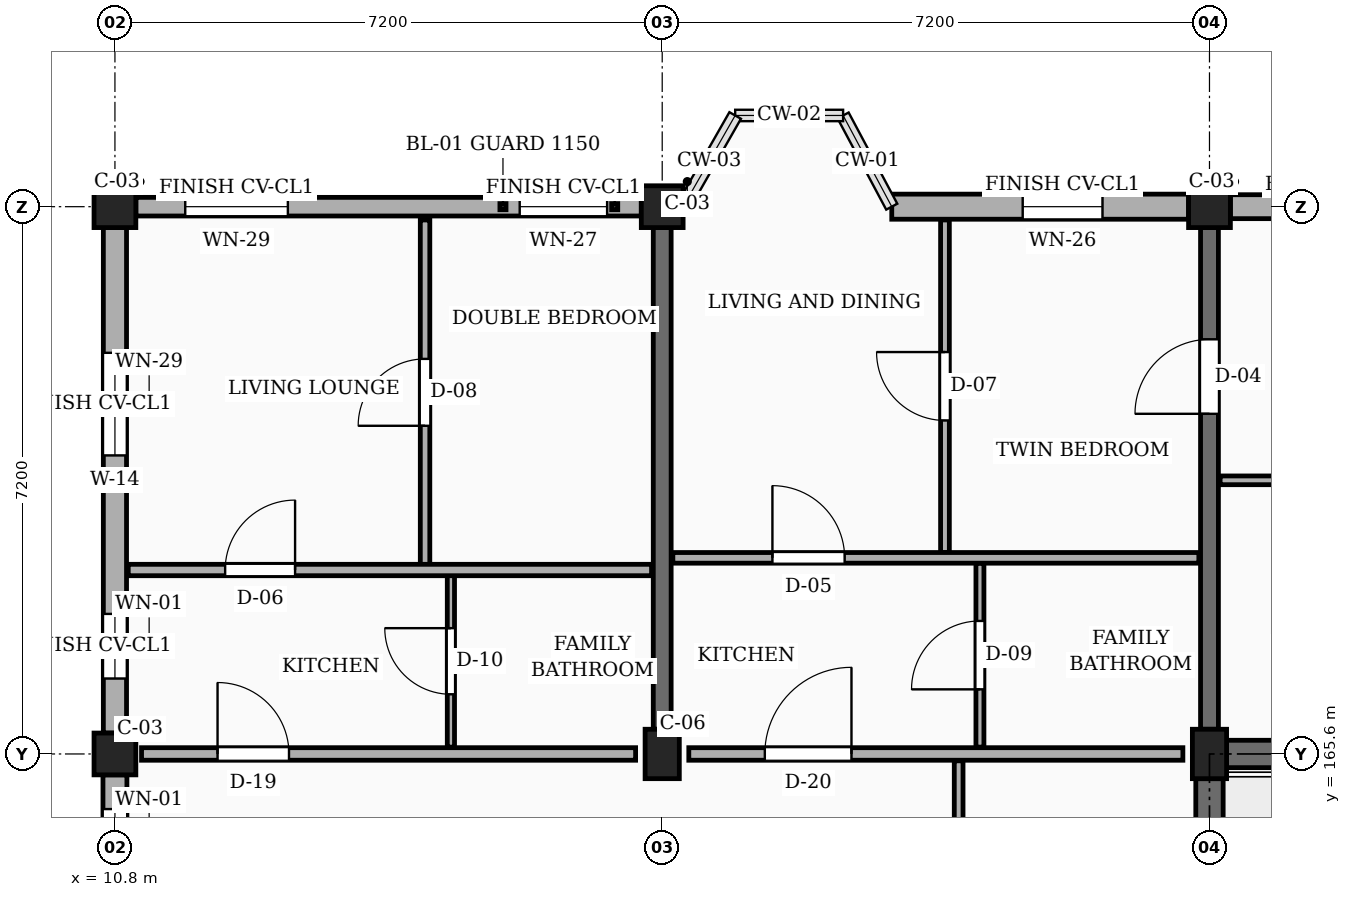
"""IFC4 building model, lengths in metres.
Left out: names, types, materials, properties, quantities, classifications, styles, units other than length and angle.
Written with IfcOpenShell. Run it as: python <this file> out.ifc"""

import sys

from ifc_helpers import new_model, si_unit, direction, frame, frame_2d, origin, origin_2d, place, context, subcontext, project, spatial, rectangle, extrude, element, fill, save


model = new_model("IFC4")
c1 = context("Model", 3, precision=1e-05, world=origin(), true_north=direction((0.0, 1.0)))
c2 = subcontext(c1, "Body", "Model", "MODEL_VIEW")
j1 = project(units=[si_unit("LENGTHUNIT", "METRE"), si_unit("PLANEANGLEUNIT", "RADIAN")], contexts=[c1])
p1 = place(None, origin())
s1 = spatial("IfcSite", under=j1, at=p1, CompositionType="ELEMENT")
p2 = place(p1, origin())
s2 = spatial("IfcBuilding", under=s1, at=p2, CompositionType="ELEMENT")
p3 = place(p2, frame((0.0, 0.0, 20.25)))
s3 = spatial("IfcBuildingStorey", under=s2, at=p3, CompositionType="ELEMENT", Elevation=20.25)
for number, where, z_axis, x_axis in (
    (1, (10.8, 165.6, 0.0), (0.0, 0.0, 1.0), (1.0, 0.0, 0.0)),
    (2, (10.8, 172.8, 0.0), (0.0, 0.0, 1.0), (1.0, 0.0, 0.0)),
):
    element("IfcColumn", number, at=place(p3, frame(where, z_axis=z_axis, x_axis=x_axis)), inside=s3, PredefinedType="COLUMN", context=c2, shape_type="SweptSolid", body=[
        extrude(rectangle(XDim=0.55, YDim=0.55, at=origin_2d()), origin(), (0.0, 0.0, 1.0), 3.15),
    ])
p4 = place(p3, frame((18.0, 165.6, 0.0), z_axis=(0.0, 0.0, 1.0), x_axis=(1.0, 0.0, 0.0)))
e3 = element("IfcColumn", 3, at=p4, inside=s3, PredefinedType="COLUMN", context=c2, shape_type="SweptSolid", body=[
    extrude(rectangle(XDim=0.45, YDim=0.65, at=origin_2d()), origin(), (0.0, 0.0, 1.0), 3.15),
])
p5 = place(p3, frame((18.0, 172.8, 0.0), z_axis=(0.0, 0.0, 1.0), x_axis=(1.0, 0.0, 0.0)))
e4 = element("IfcColumn", 4, at=p5, inside=s3, PredefinedType="COLUMN", context=c2, shape_type="SweptSolid", body=[
    extrude(rectangle(XDim=0.55, YDim=0.55, at=origin_2d()), origin(), (0.0, 0.0, 1.0), 3.15),
])
p6 = place(p3, frame((25.2, 165.6, 0.0), z_axis=(0.0, 0.0, 1.0), x_axis=(1.0, 0.0, 0.0)))
e5 = element("IfcColumn", 5, at=p6, inside=s3, PredefinedType="COLUMN", context=c2, shape_type="SweptSolid", body=[
    extrude(rectangle(XDim=0.45, YDim=0.65, at=origin_2d()), origin(), (0.0, 0.0, 1.0), 3.15),
])
p7 = place(p3, frame((25.2, 172.8, 0.0), z_axis=(0.0, 0.0, 1.0), x_axis=(1.0, 0.0, 0.0)))
e6 = element("IfcColumn", 6, at=p7, inside=s3, PredefinedType="COLUMN", context=c2, shape_type="SweptSolid", body=[
    extrude(rectangle(XDim=0.55, YDim=0.55, at=origin_2d()), origin(), (0.0, 0.0, 1.0), 3.15),
])
p8 = place(p3, frame((18.0, 165.925, 0.0), z_axis=(0.0, 0.0, 1.0), x_axis=(0.0, 1.0, 0.0)))
e7 = element("IfcWall", 7, at=p8, inside=s3, PredefinedType="SOLIDWALL", context=c2, shape_type="SweptSolid", body=[
    extrude(rectangle(XDim=6.6, YDim=0.235, at=frame_2d((3.3, 0.0))), origin(), (0.0, 0.0, 1.0), 2.185),
])
p9 = place(p3, frame((25.2, 165.925, 0.0), z_axis=(0.0, 0.0, 1.0), x_axis=(0.0, 1.0, 0.0)))
e8 = element("IfcWall", 8, at=p9, inside=s3, PredefinedType="SOLIDWALL", context=c2, shape_type="SweptSolid", body=[
    extrude(rectangle(XDim=6.6, YDim=0.235, at=frame_2d((3.3, 0.0))), origin(), (0.0, 0.0, 1.0), 2.185),
])
p10 = place(p9, frame((4.15, 0.0, 0.0)))
e9 = element("IfcOpeningElement", 9, at=p10, cuts=e8, PredefinedType="OPENING", context=c2, shape_type="SweptSolid", body=[
    extrude(rectangle(XDim=0.98, YDim=2.12, at=frame_2d((0.49, 1.06))), frame((0.0, 0.127, 0.0), z_axis=(0.0, -1.0, 0.0), x_axis=(1.0, 0.0, 0.0)), (0.0, 0.0, 1.0), 0.255),
])
p11 = place(p3, frame((32.125, 172.8, 0.0), z_axis=(0.0, 0.0, 1.0), x_axis=(-1.0, 0.0, 0.0)))
e10 = element("IfcWall", 10, at=p11, inside=s3, PredefinedType="SOLIDWALL", context=c2, shape_type="SweptSolid", body=[
    extrude(rectangle(XDim=6.65, YDim=0.315, at=frame_2d((3.325, 0.0))), origin(), (0.0, 0.0, 1.0), 2.455),
])
p12 = place(p11, frame((0.45, 0.0, 0.78)))
e11 = element("IfcOpeningElement", 11, at=p12, cuts=e10, PredefinedType="OPENING", context=c2, shape_type="SweptSolid", body=[
    extrude(rectangle(XDim=1.46, YDim=1.36, at=frame_2d((0.73, 0.68))), frame((0.0, 0.167, 0.0), z_axis=(0.0, -1.0, 0.0), x_axis=(1.0, 0.0, 0.0)), (0.0, 0.0, 1.0), 0.335),
])
p13 = place(p11, frame((4.65, 0.0, 0.78)))
e12 = element("IfcOpeningElement", 12, at=p13, cuts=e10, PredefinedType="OPENING", context=c2, shape_type="SweptSolid", body=[
    extrude(rectangle(XDim=1.05, YDim=1.44, at=frame_2d((0.525, 0.72))), frame((0.0, 0.167, 0.0), z_axis=(0.0, -1.0, 0.0), x_axis=(1.0, 0.0, 0.0)), (0.0, 0.0, 1.0), 0.335),
])
p14 = place(p3, frame((24.925, 172.8, 0.0), z_axis=(0.0, 0.0, 1.0), x_axis=(-1.0, 0.0, 0.0)))
e13 = element("IfcWall", 13, at=p14, inside=s3, PredefinedType="SOLIDWALL", context=c2, shape_type="SweptSolid", body=[
    extrude(rectangle(XDim=3.905, YDim=0.33, at=frame_2d((1.953, 0.0))), origin(), (0.0, 0.0, 1.0), 2.455),
])
p15 = place(p14, frame((1.133, 0.0, 0.78)))
e14 = element("IfcOpeningElement", 14, at=p15, cuts=e13, PredefinedType="OPENING", context=c2, shape_type="SweptSolid", body=[
    extrude(rectangle(XDim=1.05, YDim=1.44, at=frame_2d((0.525, 0.72))), frame((0.0, 0.175, 0.0), z_axis=(0.0, -1.0, 0.0), x_axis=(1.0, 0.0, 0.0)), (0.0, 0.0, 1.0), 0.35),
])
p16 = place(p3, frame((17.725, 172.8, 0.0), z_axis=(0.0, 0.0, 1.0), x_axis=(-1.0, 0.0, 0.0)))
e15 = element("IfcWall", 15, at=p16, inside=s3, PredefinedType="SOLIDWALL", context=c2, shape_type="SweptSolid", body=[
    extrude(rectangle(XDim=6.65, YDim=0.245, at=frame_2d((3.325, 0.0))), origin(), (0.0, 0.0, 1.0), 2.455),
])
p17 = place(p16, frame((0.45, 0.0, 0.78)))
e16 = element("IfcOpeningElement", 16, at=p17, cuts=e15, PredefinedType="OPENING", context=c2, shape_type="SweptSolid", body=[
    extrude(rectangle(XDim=1.15, YDim=1.44, at=frame_2d((0.575, 0.72))), frame((0.0, 0.133, 0.0), z_axis=(0.0, -1.0, 0.0), x_axis=(1.0, 0.0, 0.0)), (0.0, 0.0, 1.0), 0.265),
])
p18 = place(p16, frame((4.65, 0.0, 0.78)))
e17 = element("IfcOpeningElement", 17, at=p18, cuts=e15, PredefinedType="OPENING", context=c2, shape_type="SweptSolid", body=[
    extrude(rectangle(XDim=1.35, YDim=1.44, at=frame_2d((0.675, 0.72))), frame((0.0, 0.133, 0.0), z_axis=(0.0, -1.0, 0.0), x_axis=(1.0, 0.0, 0.0)), (0.0, 0.0, 1.0), 0.265),
])
p19 = place(p3, frame((10.8, 172.525, 0.0), z_axis=(0.0, 0.0, 1.0), x_axis=(0.0, -1.0, 0.0)))
e18 = element("IfcWall", 18, at=p19, inside=s3, PredefinedType="SOLIDWALL", context=c2, shape_type="SweptSolid", body=[
    extrude(rectangle(XDim=6.65, YDim=0.305, at=frame_2d((3.325, 0.0))), origin(), (0.0, 0.0, 1.0), 2.455),
])
p20 = place(p19, frame((1.647, 0.0, 0.78)))
e19 = element("IfcOpeningElement", 19, at=p20, cuts=e18, PredefinedType="OPENING", context=c2, shape_type="SweptSolid", body=[
    extrude(rectangle(XDim=1.35, YDim=1.44, at=frame_2d((0.675, 0.72))), frame((0.0, 0.163, 0.0), z_axis=(0.0, -1.0, 0.0), x_axis=(1.0, 0.0, 0.0)), (0.0, 0.0, 1.0), 0.325),
])
p21 = place(p19, frame((5.083, 0.0, 0.78)))
e20 = element("IfcOpeningElement", 20, at=p21, cuts=e18, PredefinedType="OPENING", context=c2, shape_type="SweptSolid", body=[
    extrude(rectangle(XDim=0.85, YDim=1.15, at=frame_2d((0.425, 0.575))), frame((0.0, 0.163, 0.0), z_axis=(0.0, -1.0, 0.0), x_axis=(1.0, 0.0, 0.0)), (0.0, 0.0, 1.0), 0.325),
])
p22 = place(p3, frame((10.8, 165.325, 0.0), z_axis=(0.0, 0.0, 1.0), x_axis=(0.0, -1.0, 0.0)))
e21 = element("IfcWall", 21, at=p22, inside=s3, PredefinedType="SOLIDWALL", context=c2, shape_type="SweptSolid", body=[
    extrude(rectangle(XDim=6.65, YDim=0.315, at=frame_2d((3.325, 0.0))), origin(), (0.0, 0.0, 1.0), 2.455),
])
p23 = place(p22, frame((0.45, 0.0, 0.78)))
e22 = element("IfcOpeningElement", 22, at=p23, cuts=e21, PredefinedType="OPENING", context=c2, shape_type="SweptSolid", body=[
    extrude(rectangle(XDim=0.85, YDim=1.15, at=frame_2d((0.425, 0.575))), frame((0.0, 0.167, 0.0), z_axis=(0.0, -1.0, 0.0), x_axis=(1.0, 0.0, 0.0)), (0.0, 0.0, 1.0), 0.335),
])
p24 = place(p22, frame((4.65, 0.0, 0.78)))
e23 = element("IfcOpeningElement", 23, at=p24, cuts=e21, PredefinedType="OPENING", context=c2, shape_type="SweptSolid", body=[
    extrude(rectangle(XDim=1.0, YDim=1.15, at=frame_2d((0.5, 0.575))), frame((0.0, 0.167, 0.0), z_axis=(0.0, -1.0, 0.0), x_axis=(1.0, 0.0, 0.0)), (0.0, 0.0, 1.0), 0.335),
])
p25 = place(p3, frame((25.2, 158.725, 0.0), z_axis=(0.0, 0.0, 1.0), x_axis=(0.0, 1.0, 0.0)))
e24 = element("IfcWall", 24, at=p25, inside=s3, PredefinedType="SHEAR", context=c2, shape_type="SweptSolid", body=[
    extrude(rectangle(XDim=6.55, YDim=0.36, at=frame_2d((3.275, 0.0))), origin(), (0.0, 0.0, 1.0), 2.885),
])
p26 = place(p3, frame((25.425, 165.6, 0.0), z_axis=(0.0, 0.0, 1.0), x_axis=(1.0, 0.0, 0.0)))
e25 = element("IfcWall", 25, at=p26, inside=s3, PredefinedType="SHEAR", context=c2, shape_type="SweptSolid", body=[
    extrude(rectangle(XDim=6.75, YDim=0.36, at=frame_2d((3.375, 0.0))), origin(), (0.0, 0.0, 1.0), 2.885),
])
p27 = place(p3, frame((11.15, 165.6, 0.0), z_axis=(0.0, 0.0, 1.0), x_axis=(1.0, 0.0, 0.0)))
e26 = element("IfcWall", 26, at=p27, inside=s3, PredefinedType="PARTITIONING", context=c2, shape_type="SweptSolid", body=[
    extrude(rectangle(XDim=6.5, YDim=0.165, at=frame_2d((3.25, 0.0))), origin(), (0.0, 0.0, 1.0), 2.32),
])
p28 = place(p27, frame((1.0, 0.0, 0.0)))
e27 = element("IfcOpeningElement", 27, at=p28, cuts=e26, PredefinedType="OPENING", context=c2, shape_type="SweptSolid", body=[
    extrude(rectangle(XDim=0.94, YDim=2.12, at=frame_2d((0.47, 1.06))), frame((0.0, 0.093, 0.0), z_axis=(0.0, -1.0, 0.0), x_axis=(1.0, 0.0, 0.0)), (0.0, 0.0, 1.0), 0.185),
])
p29 = place(p3, frame((18.35, 165.6, 0.0), z_axis=(0.0, 0.0, 1.0), x_axis=(1.0, 0.0, 0.0)))
e28 = element("IfcWall", 28, at=p29, inside=s3, PredefinedType="PARTITIONING", context=c2, shape_type="SweptSolid", body=[
    extrude(rectangle(XDim=6.5, YDim=0.165, at=frame_2d((3.25, 0.0))), origin(), (0.0, 0.0, 1.0), 2.32),
])
p30 = place(p29, frame((1.0, 0.0, 0.0)))
e29 = element("IfcOpeningElement", 29, at=p30, cuts=e28, PredefinedType="OPENING", context=c2, shape_type="SweptSolid", body=[
    extrude(rectangle(XDim=1.14, YDim=2.18, at=frame_2d((0.57, 1.09))), frame((0.0, 0.093, 0.0), z_axis=(0.0, -1.0, 0.0), x_axis=(1.0, 0.0, 0.0)), (0.0, 0.0, 1.0), 0.185),
])
p31 = place(p3, frame((14.88, 168.09, 0.0), z_axis=(0.0, 0.0, 1.0), x_axis=(0.0, 1.0, 0.0)))
e30 = element("IfcWall", 30, at=p31, inside=s3, PredefinedType="PARTITIONING", context=c2, shape_type="SweptSolid", body=[
    extrude(rectangle(XDim=4.535, YDim=0.125, at=frame_2d((2.268, 0.0))), origin(), (0.0, 0.0, 1.0), 2.32),
])
p32 = place(p31, frame((1.827, 0.0, 0.0)))
e31 = element("IfcOpeningElement", 31, at=p32, cuts=e30, PredefinedType="OPENING", context=c2, shape_type="SweptSolid", body=[
    extrude(rectangle(XDim=0.88, YDim=2.08, at=frame_2d((0.44, 1.04))), frame((0.0, 0.073, 0.0), z_axis=(0.0, -1.0, 0.0), x_axis=(1.0, 0.0, 0.0)), (0.0, 0.0, 1.0), 0.145),
])
p33 = place(p3, frame((15.22, 165.69, 0.0), z_axis=(0.0, 0.0, 1.0), x_axis=(0.0, 1.0, 0.0)))
e32 = element("IfcWall", 32, at=p33, inside=s3, PredefinedType="PARTITIONING", context=c2, shape_type="SweptSolid", body=[
    extrude(rectangle(XDim=2.26, YDim=0.095, at=frame_2d((1.13, 0.0))), origin(), (0.0, 0.0, 1.0), 2.32),
])
p34 = place(p33, frame((0.695, 0.0, 0.0)))
e33 = element("IfcOpeningElement", 33, at=p34, cuts=e32, PredefinedType="OPENING", context=c2, shape_type="SweptSolid", body=[
    extrude(rectangle(XDim=0.87, YDim=2.05, at=frame_2d((0.435, 1.025))), frame((0.0, 0.058, 0.0), z_axis=(0.0, -1.0, 0.0), x_axis=(1.0, 0.0, 0.0)), (0.0, 0.0, 1.0), 0.115),
])
p35 = place(p3, frame((10.975, 168.02, 0.0), z_axis=(0.0, 0.0, 1.0), x_axis=(1.0, 0.0, 0.0)))
e34 = element("IfcWall", 34, at=p35, inside=s3, PredefinedType="PARTITIONING", context=c2, shape_type="SweptSolid", body=[
    extrude(rectangle(XDim=6.885, YDim=0.15, at=frame_2d((3.442, 0.0))), origin(), (0.0, 0.0, 1.0), 2.32),
])
p36 = place(p35, frame((1.275, 0.0, 0.0)))
e35 = element("IfcOpeningElement", 35, at=p36, cuts=e34, PredefinedType="OPENING", context=c2, shape_type="SweptSolid", body=[
    extrude(rectangle(XDim=0.92, YDim=2.1, at=frame_2d((0.46, 1.05))), frame((0.0, 0.085, 0.0), z_axis=(0.0, -1.0, 0.0), x_axis=(1.0, 0.0, 0.0)), (0.0, 0.0, 1.0), 0.17),
])
p37 = place(p3, frame((21.9, 158.49, 0.0), z_axis=(0.0, 0.0, 1.0), x_axis=(0.0, 1.0, 0.0)))
e36 = element("IfcWall", 36, at=p37, inside=s3, PredefinedType="PARTITIONING", context=c2, shape_type="SweptSolid", body=[
    extrude(rectangle(XDim=7.02, YDim=0.115, at=frame_2d((3.51, 0.0))), origin(), (0.0, 0.0, 1.0), 2.32),
])
p38 = place(p37, frame((2.85, 0.0, 0.0)))
e37 = element("IfcOpeningElement", 37, at=p38, cuts=e36, PredefinedType="OPENING", context=c2, shape_type="SweptSolid", body=[
    extrude(rectangle(XDim=1.02, YDim=2.15, at=frame_2d((0.51, 1.075))), frame((0.0, 0.067, 0.0), z_axis=(0.0, -1.0, 0.0), x_axis=(1.0, 0.0, 0.0)), (0.0, 0.0, 1.0), 0.135),
])
p39 = place(p3, frame((21.72, 168.25, 0.0), z_axis=(0.0, 0.0, 1.0), x_axis=(0.0, 1.0, 0.0)))
e38 = element("IfcWall", 38, at=p39, inside=s3, PredefinedType="PARTITIONING", context=c2, shape_type="SweptSolid", body=[
    extrude(rectangle(XDim=4.375, YDim=0.115, at=frame_2d((2.188, 0.0))), origin(), (0.0, 0.0, 1.0), 2.32),
])
p40 = place(p39, frame((1.738, 0.0, 0.0)))
e39 = element("IfcOpeningElement", 39, at=p40, cuts=e38, PredefinedType="OPENING", context=c2, shape_type="SweptSolid", body=[
    extrude(rectangle(XDim=0.9, YDim=2.1, at=frame_2d((0.45, 1.05))), frame((0.0, 0.067, 0.0), z_axis=(0.0, -1.0, 0.0), x_axis=(1.0, 0.0, 0.0)), (0.0, 0.0, 1.0), 0.135),
])
p41 = place(p3, frame((22.18, 165.69, 0.0), z_axis=(0.0, 0.0, 1.0), x_axis=(0.0, 1.0, 0.0)))
e40 = element("IfcWall", 40, at=p41, inside=s3, PredefinedType="PARTITIONING", context=c2, shape_type="SweptSolid", body=[
    extrude(rectangle(XDim=2.42, YDim=0.105, at=frame_2d((1.21, 0.0))), origin(), (0.0, 0.0, 1.0), 2.32),
])
p42 = place(p41, frame((0.76, 0.0, 0.0)))
e41 = element("IfcOpeningElement", 41, at=p42, cuts=e40, PredefinedType="OPENING", context=c2, shape_type="SweptSolid", body=[
    extrude(rectangle(XDim=0.9, YDim=2.05, at=frame_2d((0.45, 1.025))), frame((0.0, 0.062, 0.0), z_axis=(0.0, -1.0, 0.0), x_axis=(1.0, 0.0, 0.0)), (0.0, 0.0, 1.0), 0.125),
])
p43 = place(p3, frame((18.14, 168.18, 0.0), z_axis=(0.0, 0.0, 1.0), x_axis=(1.0, 0.0, 0.0)))
e42 = element("IfcWall", 42, at=p43, inside=s3, PredefinedType="PARTITIONING", context=c2, shape_type="SweptSolid", body=[
    extrude(rectangle(XDim=6.92, YDim=0.14, at=frame_2d((3.46, 0.0))), origin(), (0.0, 0.0, 1.0), 2.32),
])
p44 = place(p43, frame((1.31, 0.0, 0.0)))
e43 = element("IfcOpeningElement", 43, at=p44, cuts=e42, PredefinedType="OPENING", context=c2, shape_type="SweptSolid", body=[
    extrude(rectangle(XDim=0.95, YDim=2.1, at=frame_2d((0.475, 1.05))), frame((0.0, 0.08, 0.0), z_axis=(0.0, -1.0, 0.0), x_axis=(1.0, 0.0, 0.0)), (0.0, 0.0, 1.0), 0.16),
])
p45 = place(p3, frame((25.34, 169.2, 0.0), z_axis=(0.0, 0.0, 1.0), x_axis=(1.0, 0.0, 0.0)))
e44 = element("IfcWall", 44, at=p45, inside=s3, PredefinedType="PARTITIONING", context=c2, shape_type="SweptSolid", body=[
    extrude(rectangle(XDim=6.92, YDim=0.115, at=frame_2d((3.46, 0.0))), origin(), (0.0, 0.0, 1.0), 2.32),
])
p46 = place(p45, frame((1.05, 0.0, 0.0)))
e45 = element("IfcOpeningElement", 45, at=p46, cuts=e44, PredefinedType="OPENING", context=c2, shape_type="SweptSolid", body=[
    extrude(rectangle(XDim=0.87, YDim=2.05, at=frame_2d((0.435, 1.025))), frame((0.0, 0.067, 0.0), z_axis=(0.0, -1.0, 0.0), x_axis=(1.0, 0.0, 0.0)), (0.0, 0.0, 1.0), 0.135),
])
p47 = place(p45, frame((4.45, 0.0, 0.0)))
e46 = element("IfcOpeningElement", 46, at=p47, cuts=e44, PredefinedType="OPENING", context=c2, shape_type="SweptSolid", body=[
    extrude(rectangle(XDim=0.88, YDim=2.08, at=frame_2d((0.44, 1.04))), frame((0.0, 0.067, 0.0), z_axis=(0.0, -1.0, 0.0), x_axis=(1.0, 0.0, 0.0)), (0.0, 0.0, 1.0), 0.135),
])
p48 = place(p15, origin())
e47 = element("IfcWindow", 47, at=p48, inside=s3, PartitioningType="SINGLE_PANEL", PredefinedType="WINDOW", context=c2, shape_type="SweptSolid", body=[
    extrude(rectangle(XDim=1.05, YDim=1.44, at=frame_2d((0.525, 0.72))), frame((0.0, 0.03, 0.0), z_axis=(0.0, -1.0, 0.0), x_axis=(1.0, 0.0, 0.0)), (0.0, 0.0, 1.0), 0.06),
])
fill(e14, e47)
p49 = place(p17, origin())
e48 = element("IfcWindow", 48, at=p49, inside=s3, PartitioningType="SINGLE_PANEL", PredefinedType="WINDOW", context=c2, shape_type="SweptSolid", body=[
    extrude(rectangle(XDim=1.15, YDim=1.44, at=frame_2d((0.575, 0.72))), frame((0.0, 0.03, 0.0), z_axis=(0.0, -1.0, 0.0), x_axis=(1.0, 0.0, 0.0)), (0.0, 0.0, 1.0), 0.06),
])
fill(e16, e48)
p50 = place(p18, origin())
e49 = element("IfcWindow", 49, at=p50, inside=s3, PartitioningType="SINGLE_PANEL", PredefinedType="WINDOW", context=c2, shape_type="SweptSolid", body=[
    extrude(rectangle(XDim=1.35, YDim=1.44, at=frame_2d((0.675, 0.72))), frame((0.0, 0.03, 0.0), z_axis=(0.0, -1.0, 0.0), x_axis=(1.0, 0.0, 0.0)), (0.0, 0.0, 1.0), 0.06),
])
fill(e17, e49)
p51 = place(p20, origin())
e50 = element("IfcWindow", 50, at=p51, inside=s3, PartitioningType="SINGLE_PANEL", PredefinedType="WINDOW", context=c2, shape_type="SweptSolid", body=[
    extrude(rectangle(XDim=1.35, YDim=1.44, at=frame_2d((0.675, 0.72))), frame((0.0, 0.03, 0.0), z_axis=(0.0, -1.0, 0.0), x_axis=(1.0, 0.0, 0.0)), (0.0, 0.0, 1.0), 0.06),
])
fill(e19, e50)
p52 = place(p21, origin())
e51 = element("IfcWindow", 51, at=p52, inside=s3, PartitioningType="SINGLE_PANEL", PredefinedType="WINDOW", context=c2, shape_type="SweptSolid", body=[
    extrude(rectangle(XDim=0.85, YDim=1.15, at=frame_2d((0.425, 0.575))), frame((0.0, 0.03, 0.0), z_axis=(0.0, -1.0, 0.0), x_axis=(1.0, 0.0, 0.0)), (0.0, 0.0, 1.0), 0.06),
])
fill(e20, e51)
p53 = place(p23, origin())
e52 = element("IfcWindow", 52, at=p53, inside=s3, PartitioningType="SINGLE_PANEL", PredefinedType="WINDOW", context=c2, shape_type="SweptSolid", body=[
    extrude(rectangle(XDim=0.85, YDim=1.15, at=frame_2d((0.425, 0.575))), frame((0.0, 0.03, 0.0), z_axis=(0.0, -1.0, 0.0), x_axis=(1.0, 0.0, 0.0)), (0.0, 0.0, 1.0), 0.06),
])
fill(e22, e52)
p54 = place(p28, origin())
e53 = element("IfcDoor", 53, at=p54, inside=s3, OperationType="SINGLE_SWING_LEFT", PredefinedType="DOOR", context=c2, shape_type="SweptSolid", body=[
    extrude(rectangle(XDim=0.94, YDim=2.12, at=frame_2d((0.47, 1.06))), frame((0.0, 0.025, 0.0), z_axis=(0.0, -1.0, 0.0), x_axis=(1.0, 0.0, 0.0)), (0.0, 0.0, 1.0), 0.05),
])
fill(e27, e53)
p55 = place(p30, origin())
e54 = element("IfcDoor", 54, at=p55, inside=s3, OperationType="SINGLE_SWING_RIGHT", PredefinedType="DOOR", context=c2, shape_type="SweptSolid", body=[
    extrude(rectangle(XDim=1.14, YDim=2.18, at=frame_2d((0.57, 1.09))), frame((0.0, 0.025, 0.0), z_axis=(0.0, -1.0, 0.0), x_axis=(1.0, 0.0, 0.0)), (0.0, 0.0, 1.0), 0.05),
])
fill(e29, e54)
p56 = place(p32, origin())
e55 = element("IfcDoor", 55, at=p56, inside=s3, OperationType="SINGLE_SWING_LEFT", PredefinedType="DOOR", context=c2, shape_type="SweptSolid", body=[
    extrude(rectangle(XDim=0.88, YDim=2.08, at=frame_2d((0.44, 1.04))), frame((0.0, 0.025, 0.0), z_axis=(0.0, -1.0, 0.0), x_axis=(1.0, 0.0, 0.0)), (0.0, 0.0, 1.0), 0.05),
])
fill(e31, e55)
p57 = place(p34, origin())
e56 = element("IfcDoor", 56, at=p57, inside=s3, OperationType="SINGLE_SWING_RIGHT", PredefinedType="DOOR", context=c2, shape_type="SweptSolid", body=[
    extrude(rectangle(XDim=0.87, YDim=2.05, at=frame_2d((0.435, 1.025))), frame((0.0, 0.025, 0.0), z_axis=(0.0, -1.0, 0.0), x_axis=(1.0, 0.0, 0.0)), (0.0, 0.0, 1.0), 0.05),
])
fill(e33, e56)
p58 = place(p36, origin())
e57 = element("IfcDoor", 57, at=p58, inside=s3, OperationType="SINGLE_SWING_RIGHT", PredefinedType="DOOR", context=c2, shape_type="SweptSolid", body=[
    extrude(rectangle(XDim=0.92, YDim=2.1, at=frame_2d((0.46, 1.05))), frame((0.0, 0.025, 0.0), z_axis=(0.0, -1.0, 0.0), x_axis=(1.0, 0.0, 0.0)), (0.0, 0.0, 1.0), 0.05),
])
fill(e35, e57)
p59 = place(p40, origin())
e58 = element("IfcDoor", 58, at=p59, inside=s3, OperationType="SINGLE_SWING_RIGHT", PredefinedType="DOOR", context=c2, shape_type="SweptSolid", body=[
    extrude(rectangle(XDim=0.9, YDim=2.1, at=frame_2d((0.45, 1.05))), frame((0.0, 0.025, 0.0), z_axis=(0.0, -1.0, 0.0), x_axis=(1.0, 0.0, 0.0)), (0.0, 0.0, 1.0), 0.05),
])
fill(e39, e58)
p60 = place(p42, origin())
e59 = element("IfcDoor", 59, at=p60, inside=s3, OperationType="SINGLE_SWING_LEFT", PredefinedType="DOOR", context=c2, shape_type="SweptSolid", body=[
    extrude(rectangle(XDim=0.9, YDim=2.05, at=frame_2d((0.45, 1.025))), frame((0.0, 0.025, 0.0), z_axis=(0.0, -1.0, 0.0), x_axis=(1.0, 0.0, 0.0)), (0.0, 0.0, 1.0), 0.05),
])
fill(e41, e59)
p61 = place(p44, origin())
e60 = element("IfcDoor", 60, at=p61, inside=s3, OperationType="SINGLE_SWING_LEFT", PredefinedType="DOOR", context=c2, shape_type="SweptSolid", body=[
    extrude(rectangle(XDim=0.95, YDim=2.1, at=frame_2d((0.475, 1.05))), frame((0.0, 0.025, 0.0), z_axis=(0.0, -1.0, 0.0), x_axis=(1.0, 0.0, 0.0)), (0.0, 0.0, 1.0), 0.05),
])
fill(e43, e60)
p62 = place(p10, origin())
e61 = element("IfcDoor", 61, at=p62, inside=s3, OperationType="SINGLE_SWING_LEFT", PredefinedType="DOOR", context=c2, shape_type="SweptSolid", body=[
    extrude(rectangle(XDim=0.98, YDim=2.12, at=frame_2d((0.49, 1.06))), frame((0.0, 0.025, 0.0), z_axis=(0.0, -1.0, 0.0), x_axis=(1.0, 0.0, 0.0)), (0.0, 0.0, 1.0), 0.05),
])
fill(e9, e61)
save(model, sys.argv[1])
